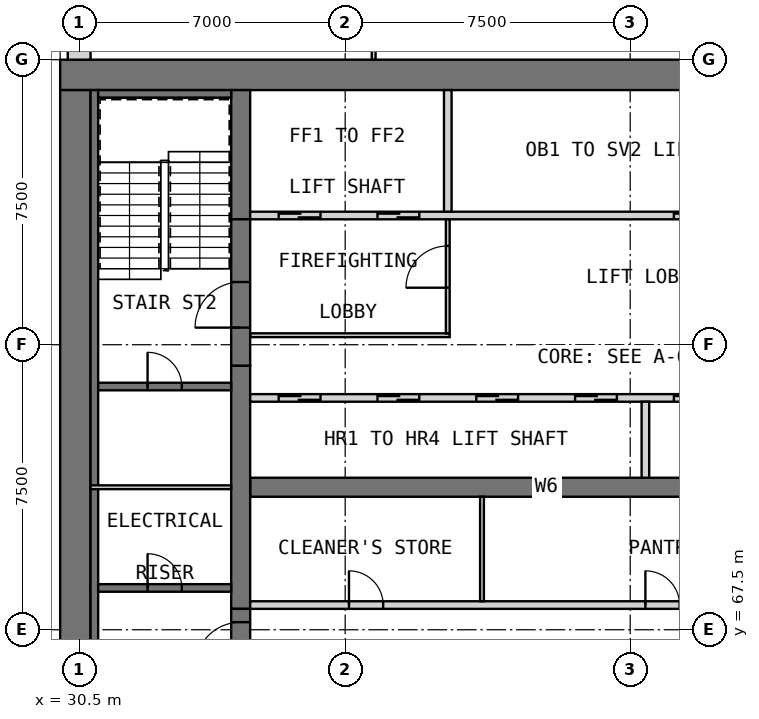
"""IFC4 building model, lengths in metres.
Left out: names, types, materials, properties, quantities, classifications, styles, units other than length and angle.
Written with IfcOpenShell. Run it as: python <this file> out.ifc"""

import sys

from ifc_helpers import new_model, si_unit, direction, frame, frame_2d, origin, place, context, subcontext, project, spatial, rectangle, extrude, element, fill, save


model = new_model("IFC4")
c1 = context("Model", 3, precision=1e-05, world=origin(), true_north=direction((0.0, 1.0)))
c2 = subcontext(c1, "Body", "Model", "MODEL_VIEW")
j1 = project(units=[si_unit("LENGTHUNIT", "METRE"), si_unit("PLANEANGLEUNIT", "RADIAN")], contexts=[c1])
p1 = place(None, origin())
s1 = spatial("IfcSite", under=j1, at=p1, CompositionType="ELEMENT")
p2 = place(p1, origin())
s2 = spatial("IfcBuilding", under=s1, at=p2, CompositionType="ELEMENT")
p3 = place(p2, frame((0.0, 0.0, 162.6)))
s3 = spatial("IfcBuildingStorey", under=s2, at=p3, CompositionType="ELEMENT", Elevation=162.6)
p4 = place(p3, frame((30.0, 82.1, 0.0), z_axis=(0.0, 0.0, 1.0), x_axis=(1.0, 0.0, 0.0)))
e1 = element("IfcWall", 1, at=p4, inside=s3, PredefinedType="SHEAR", context=c2, shape_type="SweptSolid", body=[
    extrude(rectangle(XDim=30.0, YDim=0.8, at=frame_2d((15.0, 0.0))), origin(), (0.0, 0.0, 1.0), 3.6),
])
p5 = place(p3, frame((30.4, 60.8, 0.0), z_axis=(0.0, 0.0, 1.0), x_axis=(0.0, 1.0, 0.0)))
e2 = element("IfcWall", 2, at=p5, inside=s3, PredefinedType="SHEAR", context=c2, shape_type="SweptSolid", body=[
    extrude(rectangle(XDim=20.9, YDim=0.8, at=frame_2d((10.45, 0.0))), origin(), (0.0, 0.0, 1.0), 3.6),
])
p6 = place(p3, frame((35.0, 71.25, 0.0), z_axis=(0.0, 0.0, 1.0), x_axis=(1.0, 0.0, 0.0)))
e3 = element("IfcWall", 3, at=p6, inside=s3, PredefinedType="SHEAR", context=c2, shape_type="SweptSolid", body=[
    extrude(rectangle(XDim=15.6, YDim=0.5, at=frame_2d((7.8, 0.0))), origin(), (0.0, 0.0, 1.0), 3.6),
])
p7 = place(p3, frame((34.75, 68.05, 0.0), z_axis=(0.0, 0.0, 1.0), x_axis=(0.0, 1.0, 0.0)))
e4 = element("IfcWall", 4, at=p7, inside=s3, PredefinedType="SHEAR", context=c2, shape_type="SweptSolid", body=[
    extrude(rectangle(XDim=6.4, YDim=0.5, at=frame_2d((3.2, 0.0))), origin(), (0.0, 0.0, 1.0), 3.6),
])
p8 = place(p3, frame((34.75, 78.3, 0.0), z_axis=(0.0, 0.0, 1.0), x_axis=(0.0, 1.0, 0.0)))
e5 = element("IfcWall", 5, at=p8, inside=s3, PredefinedType="SHEAR", context=c2, shape_type="SweptSolid", body=[
    extrude(rectangle(XDim=3.4, YDim=0.5, at=frame_2d((1.7, 0.0))), origin(), (0.0, 0.0, 1.0), 3.6),
])
p9 = place(p2, frame((0.0, 0.0, 34.0)))
s4 = spatial("IfcBuildingStorey", under=s2, at=p9, CompositionType="ELEMENT", Elevation=34.0)
for number, where, z_axis, x_axis in (
    (6, (29.7, 70.8, 0.0), (0.0, 0.0, 1.0), (0.0, 1.0, 0.0)),
    (7, (29.7, 75.675, 0.0), (0.0, 0.0, 1.0), (0.0, 1.0, 0.0)),
    (8, (29.7, 80.55, 0.0), (0.0, 0.0, 1.0), (0.0, 1.0, 0.0)),
):
    element("IfcWall", number, at=place(p9, frame(where, z_axis=z_axis, x_axis=x_axis)), inside=s4, PredefinedType="SOLIDWALL", context=c2, shape_type="SweptSolid", body=[
        extrude(rectangle(XDim=0.9, YDim=0.6, at=frame_2d((0.45, 0.0))), origin(), (0.0, 0.0, 1.0), 286.2),
    ])
p10 = place(p3, frame((30.5, 89.5, 0.0), z_axis=(0.0, 0.0, 1.0), x_axis=(0.0, -1.0, 0.0)))
e9 = element("IfcWall", 9, at=p10, inside=s3, PredefinedType="SOLIDWALL", context=c2, shape_type="SweptSolid", body=[
    extrude(rectangle(XDim=7.0, YDim=0.6, at=frame_2d((3.5, 0.0))), origin(), (0.0, 0.0, 1.0), 3.2),
])
p11 = place(p10, frame((3.925, 0.0, 0.8)))
e10 = element("IfcOpeningElement", 10, at=p11, cuts=e9, PredefinedType="OPENING", context=c2, shape_type="SweptSolid", body=[
    extrude(rectangle(XDim=2.4, YDim=1.8, at=frame_2d((1.2, 0.9))), frame((0.0, 0.31, 0.0), z_axis=(0.0, -1.0, 0.0), x_axis=(1.0, 0.0, 0.0)), (0.0, 0.0, 1.0), 0.62),
])
p12 = place(p10, frame((0.425, 0.0, 0.8)))
e11 = element("IfcOpeningElement", 11, at=p12, cuts=e9, PredefinedType="OPENING", context=c2, shape_type="SweptSolid", body=[
    extrude(rectangle(XDim=2.4, YDim=1.8, at=frame_2d((1.2, 0.9))), frame((0.0, 0.31, 0.0), z_axis=(0.0, -1.0, 0.0), x_axis=(1.0, 0.0, 0.0)), (0.0, 0.0, 1.0), 0.62),
])
p13 = place(p3, frame((35.0, 68.15, 0.0), z_axis=(0.0, 0.0, 1.0), x_axis=(1.0, 0.0, 0.0)))
e12 = element("IfcWall", 12, at=p13, inside=s3, PredefinedType="PARTITIONING", context=c2, shape_type="SweptSolid", body=[
    extrude(rectangle(XDim=15.6, YDim=0.2, at=frame_2d((7.8, 0.0))), origin(), (0.0, 0.0, 1.0), 3.19),
])
p14 = place(p13, frame((2.6, 0.0, 0.0)))
e13 = element("IfcOpeningElement", 13, at=p14, cuts=e12, PredefinedType="OPENING", context=c2, shape_type="SweptSolid", body=[
    extrude(rectangle(XDim=0.9, YDim=2.1, at=frame_2d((0.45, 1.05))), frame((0.0, 0.11, 0.0), z_axis=(0.0, -1.0, 0.0), x_axis=(1.0, 0.0, 0.0)), (0.0, 0.0, 1.0), 0.22),
])
p15 = place(p13, frame((10.4, 0.0, 0.0)))
e14 = element("IfcOpeningElement", 14, at=p15, cuts=e12, PredefinedType="OPENING", context=c2, shape_type="SweptSolid", body=[
    extrude(rectangle(XDim=0.9, YDim=2.1, at=frame_2d((0.45, 1.05))), frame((0.0, 0.11, 0.0), z_axis=(0.0, -1.0, 0.0), x_axis=(1.0, 0.0, 0.0)), (0.0, 0.0, 1.0), 0.22),
])
p16 = place(p3, frame((41.1, 68.25, 0.0), z_axis=(0.0, 0.0, 1.0), x_axis=(0.0, 1.0, 0.0)))
e15 = element("IfcWall", 15, at=p16, inside=s3, PredefinedType="PARTITIONING", context=c2, shape_type="SweptSolid", body=[
    extrude(rectangle(XDim=2.75, YDim=0.1, at=frame_2d((1.375, 0.0))), origin(), (0.0, 0.0, 1.0), 3.19),
])
p17 = place(p3, frame((35.0, 73.6, 0.0), z_axis=(0.0, 0.0, 1.0), x_axis=(1.0, 0.0, 0.0)))
e16 = element("IfcWall", 16, at=p17, inside=s3, PredefinedType="SOLIDWALL", context=c2, shape_type="SweptSolid", body=[
    extrude(rectangle(XDim=15.6, YDim=0.2, at=frame_2d((7.8, 0.0))), origin(), (0.0, 0.0, 1.0), 3.6),
])
p18 = place(p17, frame((0.75, 0.0, 0.0)))
e17 = element("IfcOpeningElement", 17, at=p18, cuts=e16, PredefinedType="OPENING", context=c2, shape_type="SweptSolid", body=[
    extrude(rectangle(XDim=1.1, YDim=2.1, at=frame_2d((0.55, 1.05))), frame((0.0, 0.11, 0.0), z_axis=(0.0, -1.0, 0.0), x_axis=(1.0, 0.0, 0.0)), (0.0, 0.0, 1.0), 0.22),
])
p19 = place(p17, frame((3.35, 0.0, 0.0)))
e18 = element("IfcOpeningElement", 18, at=p19, cuts=e16, PredefinedType="OPENING", context=c2, shape_type="SweptSolid", body=[
    extrude(rectangle(XDim=1.1, YDim=2.1, at=frame_2d((0.55, 1.05))), frame((0.0, 0.11, 0.0), z_axis=(0.0, -1.0, 0.0), x_axis=(1.0, 0.0, 0.0)), (0.0, 0.0, 1.0), 0.22),
])
p20 = place(p17, frame((5.95, 0.0, 0.0)))
e19 = element("IfcOpeningElement", 19, at=p20, cuts=e16, PredefinedType="OPENING", context=c2, shape_type="SweptSolid", body=[
    extrude(rectangle(XDim=1.1, YDim=2.1, at=frame_2d((0.55, 1.05))), frame((0.0, 0.11, 0.0), z_axis=(0.0, -1.0, 0.0), x_axis=(1.0, 0.0, 0.0)), (0.0, 0.0, 1.0), 0.22),
])
p21 = place(p17, frame((8.55, 0.0, 0.0)))
e20 = element("IfcOpeningElement", 20, at=p21, cuts=e16, PredefinedType="OPENING", context=c2, shape_type="SweptSolid", body=[
    extrude(rectangle(XDim=1.1, YDim=2.1, at=frame_2d((0.55, 1.05))), frame((0.0, 0.11, 0.0), z_axis=(0.0, -1.0, 0.0), x_axis=(1.0, 0.0, 0.0)), (0.0, 0.0, 1.0), 0.22),
])
p22 = place(p17, frame((11.15, 0.0, 0.0)))
e21 = element("IfcOpeningElement", 21, at=p22, cuts=e16, PredefinedType="OPENING", context=c2, shape_type="SweptSolid", body=[
    extrude(rectangle(XDim=1.1, YDim=2.1, at=frame_2d((0.55, 1.05))), frame((0.0, 0.11, 0.0), z_axis=(0.0, -1.0, 0.0), x_axis=(1.0, 0.0, 0.0)), (0.0, 0.0, 1.0), 0.22),
])
p23 = place(p17, frame((13.75, 0.0, 0.0)))
e22 = element("IfcOpeningElement", 22, at=p23, cuts=e16, PredefinedType="OPENING", context=c2, shape_type="SweptSolid", body=[
    extrude(rectangle(XDim=1.1, YDim=2.1, at=frame_2d((0.55, 1.05))), frame((0.0, 0.11, 0.0), z_axis=(0.0, -1.0, 0.0), x_axis=(1.0, 0.0, 0.0)), (0.0, 0.0, 1.0), 0.22),
])
p24 = place(p3, frame((45.4, 71.5, 0.0), z_axis=(0.0, 0.0, 1.0), x_axis=(0.0, 1.0, 0.0)))
e23 = element("IfcWall", 23, at=p24, inside=s3, PredefinedType="SOLIDWALL", context=c2, shape_type="SweptSolid", body=[
    extrude(rectangle(XDim=2.0, YDim=0.2, at=frame_2d((1.0, 0.0))), origin(), (0.0, 0.0, 1.0), 3.6),
])
p25 = place(p3, frame((35.0, 78.4, 0.0), z_axis=(0.0, 0.0, 1.0), x_axis=(1.0, 0.0, 0.0)))
e24 = element("IfcWall", 24, at=p25, inside=s3, PredefinedType="SOLIDWALL", context=c2, shape_type="SweptSolid", body=[
    extrude(rectangle(XDim=15.6, YDim=0.2, at=frame_2d((7.8, 0.0))), origin(), (0.0, 0.0, 1.0), 3.6),
])
p26 = place(p25, frame((0.75, 0.0, 0.0)))
e25 = element("IfcOpeningElement", 25, at=p26, cuts=e24, PredefinedType="OPENING", context=c2, shape_type="SweptSolid", body=[
    extrude(rectangle(XDim=1.1, YDim=2.1, at=frame_2d((0.55, 1.05))), frame((0.0, 0.11, 0.0), z_axis=(0.0, -1.0, 0.0), x_axis=(1.0, 0.0, 0.0)), (0.0, 0.0, 1.0), 0.22),
])
p27 = place(p25, frame((3.35, 0.0, 0.0)))
e26 = element("IfcOpeningElement", 26, at=p27, cuts=e24, PredefinedType="OPENING", context=c2, shape_type="SweptSolid", body=[
    extrude(rectangle(XDim=1.1, YDim=2.1, at=frame_2d((0.55, 1.05))), frame((0.0, 0.11, 0.0), z_axis=(0.0, -1.0, 0.0), x_axis=(1.0, 0.0, 0.0)), (0.0, 0.0, 1.0), 0.22),
])
p28 = place(p25, frame((11.15, 0.0, 0.0)))
e27 = element("IfcOpeningElement", 27, at=p28, cuts=e24, PredefinedType="OPENING", context=c2, shape_type="SweptSolid", body=[
    extrude(rectangle(XDim=1.1, YDim=2.1, at=frame_2d((0.55, 1.05))), frame((0.0, 0.11, 0.0), z_axis=(0.0, -1.0, 0.0), x_axis=(1.0, 0.0, 0.0)), (0.0, 0.0, 1.0), 0.22),
])
p29 = place(p25, frame((13.75, 0.0, 0.0)))
e28 = element("IfcOpeningElement", 28, at=p29, cuts=e24, PredefinedType="OPENING", context=c2, shape_type="SweptSolid", body=[
    extrude(rectangle(XDim=1.1, YDim=2.1, at=frame_2d((0.55, 1.05))), frame((0.0, 0.11, 0.0), z_axis=(0.0, -1.0, 0.0), x_axis=(1.0, 0.0, 0.0)), (0.0, 0.0, 1.0), 0.22),
])
p30 = place(p3, frame((40.2, 78.5, 0.0), z_axis=(0.0, 0.0, 1.0), x_axis=(0.0, 1.0, 0.0)))
e29 = element("IfcWall", 29, at=p30, inside=s3, PredefinedType="SOLIDWALL", context=c2, shape_type="SweptSolid", body=[
    extrude(rectangle(XDim=3.2, YDim=0.2, at=frame_2d((1.6, 0.0))), origin(), (0.0, 0.0, 1.0), 3.6),
])
p31 = place(p3, frame((35.0, 75.25, 0.0), z_axis=(0.0, 0.0, 1.0), x_axis=(1.0, 0.0, 0.0)))
e30 = element("IfcWall", 30, at=p31, inside=s3, PredefinedType="PARTITIONING", context=c2, shape_type="SweptSolid", body=[
    extrude(rectangle(XDim=5.25, YDim=0.1, at=frame_2d((2.625, 0.0))), origin(), (0.0, 0.0, 1.0), 3.19),
])
p32 = place(p3, frame((40.2, 75.3, 0.0), z_axis=(0.0, 0.0, 1.0), x_axis=(0.0, 1.0, 0.0)))
e31 = element("IfcWall", 31, at=p32, inside=s3, PredefinedType="PARTITIONING", context=c2, shape_type="SweptSolid", body=[
    extrude(rectangle(XDim=3.0, YDim=0.1, at=frame_2d((1.5, 0.0))), origin(), (0.0, 0.0, 1.0), 3.19),
])
p33 = place(p32, frame((1.2, 0.0, 0.0)))
e32 = element("IfcOpeningElement", 32, at=p33, cuts=e31, PredefinedType="OPENING", context=c2, shape_type="SweptSolid", body=[
    extrude(rectangle(XDim=1.1, YDim=2.1, at=frame_2d((0.55, 1.05))), frame((0.0, 0.06, 0.0), z_axis=(0.0, -1.0, 0.0), x_axis=(1.0, 0.0, 0.0)), (0.0, 0.0, 1.0), 0.12),
])
p34 = place(p3, frame((34.75, 64.2, 0.0), z_axis=(0.0, 0.0, 1.0), x_axis=(0.0, 1.0, 0.0)))
e33 = element("IfcWall", 33, at=p34, inside=s3, PredefinedType="SOLIDWALL", context=c2, shape_type="SweptSolid", body=[
    extrude(rectangle(XDim=3.85, YDim=0.5, at=frame_2d((1.925, 0.0))), origin(), (0.0, 0.0, 1.0), 2.4),
])
p35 = place(p34, frame((2.3, 0.0, 0.0)))
e34 = element("IfcOpeningElement", 34, at=p35, cuts=e33, PredefinedType="OPENING", context=c2, shape_type="SweptSolid", body=[
    extrude(rectangle(XDim=1.2, YDim=2.1, at=frame_2d((0.6, 1.05))), frame((0.0, 0.26, 0.0), z_axis=(0.0, -1.0, 0.0), x_axis=(1.0, 0.0, 0.0)), (0.0, 0.0, 1.0), 0.52),
])
p36 = place(p3, frame((34.75, 74.45, 0.0), z_axis=(0.0, 0.0, 1.0), x_axis=(0.0, 1.0, 0.0)))
e35 = element("IfcWall", 35, at=p36, inside=s3, PredefinedType="SOLIDWALL", context=c2, shape_type="SweptSolid", body=[
    extrude(rectangle(XDim=3.85, YDim=0.5, at=frame_2d((1.925, 0.0))), origin(), (0.0, 0.0, 1.0), 2.4),
])
p37 = place(p36, frame((1.0, 0.0, 0.0)))
e36 = element("IfcOpeningElement", 36, at=p37, cuts=e35, PredefinedType="OPENING", context=c2, shape_type="SweptSolid", body=[
    extrude(rectangle(XDim=1.2, YDim=2.1, at=frame_2d((0.6, 1.05))), frame((0.0, 0.26, 0.0), z_axis=(0.0, -1.0, 0.0), x_axis=(1.0, 0.0, 0.0)), (0.0, 0.0, 1.0), 0.52),
])
p38 = place(p3, frame((30.8, 68.6, 0.0), z_axis=(0.0, 0.0, 1.0), x_axis=(1.0, 0.0, 0.0)))
e37 = element("IfcWall", 37, at=p38, inside=s3, PredefinedType="SOLIDWALL", context=c2, shape_type="SweptSolid", body=[
    extrude(rectangle(XDim=3.7, YDim=0.2, at=frame_2d((1.85, 0.0))), origin(), (0.0, 0.0, 1.0), 3.19),
])
p39 = place(p38, frame((1.5, 0.0, 0.0)))
e38 = element("IfcOpeningElement", 38, at=p39, cuts=e37, PredefinedType="OPENING", context=c2, shape_type="SweptSolid", body=[
    extrude(rectangle(XDim=0.9, YDim=2.1, at=frame_2d((0.45, 1.05))), frame((0.0, 0.11, 0.0), z_axis=(0.0, -1.0, 0.0), x_axis=(1.0, 0.0, 0.0)), (0.0, 0.0, 1.0), 0.22),
])
p40 = place(p3, frame((30.8, 73.9, 0.0), z_axis=(0.0, 0.0, 1.0), x_axis=(1.0, 0.0, 0.0)))
e39 = element("IfcWall", 39, at=p40, inside=s3, PredefinedType="SOLIDWALL", context=c2, shape_type="SweptSolid", body=[
    extrude(rectangle(XDim=3.7, YDim=0.2, at=frame_2d((1.85, 0.0))), origin(), (0.0, 0.0, 1.0), 3.19),
])
p41 = place(p40, frame((1.5, 0.0, 0.0)))
e40 = element("IfcOpeningElement", 40, at=p41, cuts=e39, PredefinedType="OPENING", context=c2, shape_type="SweptSolid", body=[
    extrude(rectangle(XDim=0.9, YDim=2.1, at=frame_2d((0.45, 1.05))), frame((0.0, 0.11, 0.0), z_axis=(0.0, -1.0, 0.0), x_axis=(1.0, 0.0, 0.0)), (0.0, 0.0, 1.0), 0.22),
])
p42 = place(p3, frame((30.9, 60.8, 0.0), z_axis=(0.0, 0.0, 1.0), x_axis=(0.0, 1.0, 0.0)))
e41 = element("IfcWall", 41, at=p42, inside=s3, PredefinedType="SOLIDWALL", context=c2, shape_type="SweptSolid", body=[
    extrude(rectangle(XDim=20.9, YDim=0.2, at=frame_2d((10.45, 0.0))), origin(), (0.0, 0.0, 1.0), 3.19),
])
p43 = place(p3, frame((31.0, 81.6, 0.0), z_axis=(0.0, 0.0, 1.0), x_axis=(1.0, 0.0, 0.0)))
e42 = element("IfcWall", 42, at=p43, inside=s3, PredefinedType="SOLIDWALL", context=c2, shape_type="SweptSolid", body=[
    extrude(rectangle(XDim=3.5, YDim=0.2, at=frame_2d((1.75, 0.0))), origin(), (0.0, 0.0, 1.0), 3.19),
])
p44 = place(p3, frame((30.8, 71.25, 0.0), z_axis=(0.0, 0.0, 1.0), x_axis=(1.0, 0.0, 0.0)))
e43 = element("IfcWall", 43, at=p44, inside=s3, PredefinedType="PARTITIONING", context=c2, shape_type="SweptSolid", body=[
    extrude(rectangle(XDim=3.7, YDim=0.1, at=frame_2d((1.85, 0.0))), origin(), (0.0, 0.0, 1.0), 3.19),
])
p45 = place(p3, frame((38.25, 82.5, 0.0), z_axis=(0.0, 0.0, 1.0), x_axis=(0.0, 1.0, 0.0)))
e44 = element("IfcWall", 44, at=p45, inside=s3, PredefinedType="PARTITIONING", context=c2, shape_type="SweptSolid", body=[
    extrude(rectangle(XDim=3.675, YDim=0.1, at=frame_2d((1.837, 0.0))), origin(), (0.0, 0.0, 1.0), 3.2),
])
p46 = place(p14, origin())
e45 = element("IfcDoor", 45, at=p46, inside=s3, OperationType="SINGLE_SWING_RIGHT", PredefinedType="DOOR", context=c2, shape_type="SweptSolid", body=[
    extrude(rectangle(XDim=0.9, YDim=2.1, at=frame_2d((0.45, 1.05))), frame((0.0, 0.025, 0.0), z_axis=(0.0, -1.0, 0.0), x_axis=(1.0, 0.0, 0.0)), (0.0, 0.0, 1.0), 0.05),
])
fill(e13, e45)
p47 = place(p15, origin())
e46 = element("IfcDoor", 46, at=p47, inside=s3, OperationType="SINGLE_SWING_LEFT", PredefinedType="DOOR", context=c2, shape_type="SweptSolid", body=[
    extrude(rectangle(XDim=0.9, YDim=2.1, at=frame_2d((0.45, 1.05))), frame((0.0, 0.025, 0.0), z_axis=(0.0, -1.0, 0.0), x_axis=(1.0, 0.0, 0.0)), (0.0, 0.0, 1.0), 0.05),
])
fill(e14, e46)
p48 = place(p18, origin())
e47 = element("IfcDoor", 47, at=p48, inside=s3, OperationType="DOUBLE_DOOR_SLIDING", PredefinedType="DOOR", context=c2, shape_type="SweptSolid", body=[
    extrude(rectangle(XDim=1.1, YDim=2.1, at=frame_2d((0.55, 1.05))), frame((0.0, 0.025, 0.0), z_axis=(0.0, -1.0, 0.0), x_axis=(1.0, 0.0, 0.0)), (0.0, 0.0, 1.0), 0.05),
])
fill(e17, e47)
p49 = place(p19, origin())
e48 = element("IfcDoor", 48, at=p49, inside=s3, OperationType="DOUBLE_DOOR_SLIDING", PredefinedType="DOOR", context=c2, shape_type="SweptSolid", body=[
    extrude(rectangle(XDim=1.1, YDim=2.1, at=frame_2d((0.55, 1.05))), frame((0.0, 0.025, 0.0), z_axis=(0.0, -1.0, 0.0), x_axis=(1.0, 0.0, 0.0)), (0.0, 0.0, 1.0), 0.05),
])
fill(e18, e48)
p50 = place(p20, origin())
e49 = element("IfcDoor", 49, at=p50, inside=s3, OperationType="DOUBLE_DOOR_SLIDING", PredefinedType="DOOR", context=c2, shape_type="SweptSolid", body=[
    extrude(rectangle(XDim=1.1, YDim=2.1, at=frame_2d((0.55, 1.05))), frame((0.0, 0.025, 0.0), z_axis=(0.0, -1.0, 0.0), x_axis=(1.0, 0.0, 0.0)), (0.0, 0.0, 1.0), 0.05),
])
fill(e19, e49)
p51 = place(p21, origin())
e50 = element("IfcDoor", 50, at=p51, inside=s3, OperationType="DOUBLE_DOOR_SLIDING", PredefinedType="DOOR", context=c2, shape_type="SweptSolid", body=[
    extrude(rectangle(XDim=1.1, YDim=2.1, at=frame_2d((0.55, 1.05))), frame((0.0, 0.025, 0.0), z_axis=(0.0, -1.0, 0.0), x_axis=(1.0, 0.0, 0.0)), (0.0, 0.0, 1.0), 0.05),
])
fill(e20, e50)
p52 = place(p22, origin())
e51 = element("IfcDoor", 51, at=p52, inside=s3, OperationType="DOUBLE_DOOR_SLIDING", PredefinedType="DOOR", context=c2, shape_type="SweptSolid", body=[
    extrude(rectangle(XDim=1.1, YDim=2.1, at=frame_2d((0.55, 1.05))), frame((0.0, 0.025, 0.0), z_axis=(0.0, -1.0, 0.0), x_axis=(1.0, 0.0, 0.0)), (0.0, 0.0, 1.0), 0.05),
])
fill(e21, e51)
p53 = place(p26, origin())
e52 = element("IfcDoor", 52, at=p53, inside=s3, OperationType="DOUBLE_DOOR_SLIDING", PredefinedType="DOOR", context=c2, shape_type="SweptSolid", body=[
    extrude(rectangle(XDim=1.1, YDim=2.1, at=frame_2d((0.55, 1.05))), frame((0.0, 0.025, 0.0), z_axis=(0.0, -1.0, 0.0), x_axis=(1.0, 0.0, 0.0)), (0.0, 0.0, 1.0), 0.05),
])
fill(e25, e52)
p54 = place(p27, origin())
e53 = element("IfcDoor", 53, at=p54, inside=s3, OperationType="DOUBLE_DOOR_SLIDING", PredefinedType="DOOR", context=c2, shape_type="SweptSolid", body=[
    extrude(rectangle(XDim=1.1, YDim=2.1, at=frame_2d((0.55, 1.05))), frame((0.0, 0.025, 0.0), z_axis=(0.0, -1.0, 0.0), x_axis=(1.0, 0.0, 0.0)), (0.0, 0.0, 1.0), 0.05),
])
fill(e26, e53)
p55 = place(p28, origin())
e54 = element("IfcDoor", 54, at=p55, inside=s3, OperationType="DOUBLE_DOOR_SLIDING", PredefinedType="DOOR", context=c2, shape_type="SweptSolid", body=[
    extrude(rectangle(XDim=1.1, YDim=2.1, at=frame_2d((0.55, 1.05))), frame((0.0, 0.025, 0.0), z_axis=(0.0, -1.0, 0.0), x_axis=(1.0, 0.0, 0.0)), (0.0, 0.0, 1.0), 0.05),
])
fill(e27, e54)
p56 = place(p33, origin())
e55 = element("IfcDoor", 55, at=p56, inside=s3, OperationType="SINGLE_SWING_LEFT", PredefinedType="DOOR", context=c2, shape_type="SweptSolid", body=[
    extrude(rectangle(XDim=1.1, YDim=2.1, at=frame_2d((0.55, 1.05))), frame((0.0, 0.025, 0.0), z_axis=(0.0, -1.0, 0.0), x_axis=(1.0, 0.0, 0.0)), (0.0, 0.0, 1.0), 0.05),
])
fill(e32, e55)
p57 = place(p35, origin())
e56 = element("IfcDoor", 56, at=p57, inside=s3, OperationType="SINGLE_SWING_LEFT", PredefinedType="DOOR", context=c2, shape_type="SweptSolid", body=[
    extrude(rectangle(XDim=1.2, YDim=2.1, at=frame_2d((0.6, 1.05))), frame((0.0, 0.025, 0.0), z_axis=(0.0, -1.0, 0.0), x_axis=(1.0, 0.0, 0.0)), (0.0, 0.0, 1.0), 0.05),
])
fill(e34, e56)
p58 = place(p37, origin())
e57 = element("IfcDoor", 57, at=p58, inside=s3, OperationType="SINGLE_SWING_RIGHT", PredefinedType="DOOR", context=c2, shape_type="SweptSolid", body=[
    extrude(rectangle(XDim=1.2, YDim=2.1, at=frame_2d((0.6, 1.05))), frame((0.0, 0.025, 0.0), z_axis=(0.0, -1.0, 0.0), x_axis=(1.0, 0.0, 0.0)), (0.0, 0.0, 1.0), 0.05),
])
fill(e36, e57)
p59 = place(p39, origin())
e58 = element("IfcDoor", 58, at=p59, inside=s3, OperationType="SINGLE_SWING_LEFT", PredefinedType="DOOR", context=c2, shape_type="SweptSolid", body=[
    extrude(rectangle(XDim=0.9, YDim=2.1, at=frame_2d((0.45, 1.05))), frame((0.0, 0.025, 0.0), z_axis=(0.0, -1.0, 0.0), x_axis=(1.0, 0.0, 0.0)), (0.0, 0.0, 1.0), 0.05),
])
fill(e38, e58)
p60 = place(p41, origin())
e59 = element("IfcDoor", 59, at=p60, inside=s3, OperationType="SINGLE_SWING_RIGHT", PredefinedType="DOOR", context=c2, shape_type="SweptSolid", body=[
    extrude(rectangle(XDim=0.9, YDim=2.1, at=frame_2d((0.45, 1.05))), frame((0.0, 0.025, 0.0), z_axis=(0.0, -1.0, 0.0), x_axis=(1.0, 0.0, 0.0)), (0.0, 0.0, 1.0), 0.05),
])
fill(e40, e59)
save(model, sys.argv[1])
